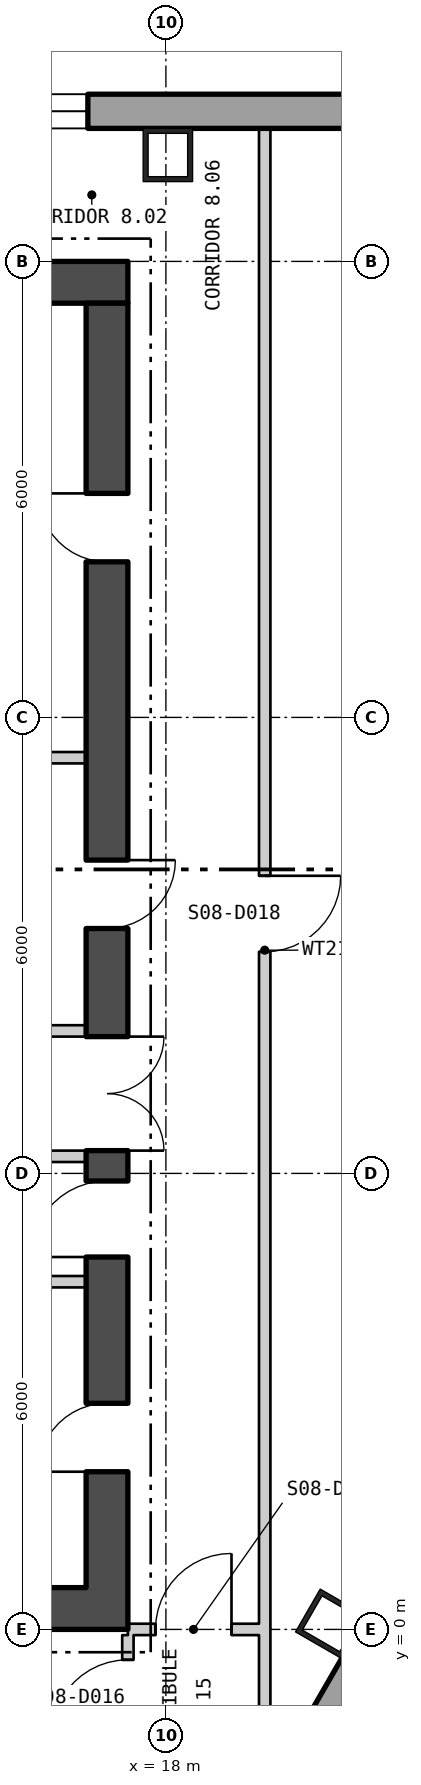
"""IFC4 building model, lengths in metres.
Left out: names, types, materials, properties, quantities, classifications, styles, units other than length and angle.
Written with IfcOpenShell. Run it as: python <this file> out.ifc"""

import sys

from ifc_helpers import new_model, si_unit, direction, frame, frame_2d, origin, origin_2d, place, context, subcontext, project, spatial, polyline, rectangle, hollow_rectangle, outline, extrude, element, fill, save


model = new_model("IFC4")
c1 = context("Model", 3, precision=1e-05, world=origin(), true_north=direction((0.0, 1.0)))
c2 = subcontext(c1, "Body", "Model", "MODEL_VIEW")
j1 = project(units=[si_unit("LENGTHUNIT", "METRE"), si_unit("PLANEANGLEUNIT", "RADIAN")], contexts=[c1])
p1 = place(None, origin())
s1 = spatial("IfcSite", under=j1, at=p1, CompositionType="ELEMENT")
p2 = place(p1, origin())
s2 = spatial("IfcBuilding", under=s1, at=p2, CompositionType="ELEMENT")
p3 = place(p2, frame((0.0, 0.0, 111.3)))
s3 = spatial("IfcBuildingStorey", under=s2, at=p3, CompositionType="ELEMENT", Elevation=111.3)
for number, where, z_axis, x_axis in (
    (1, (18.026, 19.4, 0.0), (0.0, 0.0, 1.0), (-1.0, 0.0, 0.0)),
    (2, (20.171, 0.074, 0.0), (0.0, 0.0, 1.0), (0.5, 0.866, 0.0)),
):
    element("IfcColumn", number, at=place(p3, frame(where, z_axis=z_axis, x_axis=x_axis)), inside=s3, PredefinedType="COLUMN", context=c2, shape_type="SweptSolid", body=[
        extrude(hollow_rectangle(XDim=0.65, YDim=0.7, WallThickness=0.065, at=origin_2d()), origin(), (0.0, 0.0, 1.0), 4.5),
    ])
p4 = place(p3, frame((22.865, 19.975, -0.4), z_axis=(0.0, 0.0, 1.0), x_axis=(-1.0, 0.0, 0.0)))
e3 = element("IfcWall", 3, at=p4, inside=s3, PredefinedType="SOLIDWALL", context=c2, shape_type="SweptSolid", body=[
    extrude(outline(polyline([(-0.13, -0.225), (45.86, -0.225), (45.6, 0.225), (0.13, 0.225), (-0.13, -0.225)])), origin(), (0.0, 0.0, 1.0), 4.5),
])
p5 = place(p4, frame((5.892, 0.0, 1.3)))
e4 = element("IfcOpeningElement", 4, at=p5, cuts=e3, PredefinedType="OPENING", context=c2, shape_type="SweptSolid", body=[
    extrude(rectangle(XDim=2.4, YDim=2.6, at=frame_2d((1.2, 1.3))), frame((0.0, 0.235, 0.0), z_axis=(0.0, -1.0, 0.0), x_axis=(1.0, 0.0, 0.0)), (0.0, 0.0, 1.0), 0.47),
])
p6 = place(p4, frame((10.399, 0.0, 1.3)))
e5 = element("IfcOpeningElement", 5, at=p6, cuts=e3, PredefinedType="OPENING", context=c2, shape_type="SweptSolid", body=[
    extrude(rectangle(XDim=2.4, YDim=2.6, at=frame_2d((1.2, 1.3))), frame((0.0, 0.235, 0.0), z_axis=(0.0, -1.0, 0.0), x_axis=(1.0, 0.0, 0.0)), (0.0, 0.0, 1.0), 0.47),
])
p7 = place(p4, frame((14.905, 0.0, 1.3)))
e6 = element("IfcOpeningElement", 6, at=p7, cuts=e3, PredefinedType="OPENING", context=c2, shape_type="SweptSolid", body=[
    extrude(rectangle(XDim=2.4, YDim=2.6, at=frame_2d((1.2, 1.3))), frame((0.0, 0.235, 0.0), z_axis=(0.0, -1.0, 0.0), x_axis=(1.0, 0.0, 0.0)), (0.0, 0.0, 1.0), 0.47),
])
p8 = place(p4, frame((19.412, 0.0, 1.3)))
e7 = element("IfcOpeningElement", 7, at=p8, cuts=e3, PredefinedType="OPENING", context=c2, shape_type="SweptSolid", body=[
    extrude(rectangle(XDim=2.4, YDim=2.6, at=frame_2d((1.2, 1.3))), frame((0.0, 0.235, 0.0), z_axis=(0.0, -1.0, 0.0), x_axis=(1.0, 0.0, 0.0)), (0.0, 0.0, 1.0), 0.47),
])
p9 = place(p4, frame((23.918, 0.0, 1.3)))
e8 = element("IfcOpeningElement", 8, at=p9, cuts=e3, PredefinedType="OPENING", context=c2, shape_type="SweptSolid", body=[
    extrude(rectangle(XDim=2.4, YDim=2.6, at=frame_2d((1.2, 1.3))), frame((0.0, 0.235, 0.0), z_axis=(0.0, -1.0, 0.0), x_axis=(1.0, 0.0, 0.0)), (0.0, 0.0, 1.0), 0.47),
])
p10 = place(p4, frame((28.425, 0.0, 1.3)))
e9 = element("IfcOpeningElement", 9, at=p10, cuts=e3, PredefinedType="OPENING", context=c2, shape_type="SweptSolid", body=[
    extrude(rectangle(XDim=2.4, YDim=2.6, at=frame_2d((1.2, 1.3))), frame((0.0, 0.235, 0.0), z_axis=(0.0, -1.0, 0.0), x_axis=(1.0, 0.0, 0.0)), (0.0, 0.0, 1.0), 0.47),
])
p11 = place(p4, frame((32.932, 0.0, 1.3)))
e10 = element("IfcOpeningElement", 10, at=p11, cuts=e3, PredefinedType="OPENING", context=c2, shape_type="SweptSolid", body=[
    extrude(rectangle(XDim=2.4, YDim=2.6, at=frame_2d((1.2, 1.3))), frame((0.0, 0.235, 0.0), z_axis=(0.0, -1.0, 0.0), x_axis=(1.0, 0.0, 0.0)), (0.0, 0.0, 1.0), 0.47),
])
p12 = place(p4, frame((37.438, 0.0, 1.3)))
e11 = element("IfcOpeningElement", 11, at=p12, cuts=e3, PredefinedType="OPENING", context=c2, shape_type="SweptSolid", body=[
    extrude(rectangle(XDim=2.4, YDim=2.6, at=frame_2d((1.2, 1.3))), frame((0.0, 0.235, 0.0), z_axis=(0.0, -1.0, 0.0), x_axis=(1.0, 0.0, 0.0)), (0.0, 0.0, 1.0), 0.47),
])
p13 = place(p3, frame((4.73, -27.821, -0.18), z_axis=(0.0, 0.0, 1.0), x_axis=(0.500000141277, 0.866025322218, 0.0)))
e12 = element("IfcWall", 12, at=p13, inside=s3, PredefinedType="SOLIDWALL", context=c2, shape_type="SweptSolid", body=[
    extrude(outline(polyline([(-0.13, -0.225), (45.86, -0.225), (45.6, 0.225), (0.13, 0.225), (-0.13, -0.225)])), origin(), (0.0, 0.0, 1.0), 4.28),
])
p14 = place(p13, frame((1.424, 0.0, 1.08)))
e13 = element("IfcOpeningElement", 13, at=p14, cuts=e12, PredefinedType="OPENING", context=c2, shape_type="SweptSolid", body=[
    extrude(rectangle(XDim=2.4, YDim=2.6, at=frame_2d((1.2, 1.3))), frame((0.0, 0.235, 0.0), z_axis=(0.0, -1.0, 0.0), x_axis=(1.0, 0.0, 0.0)), (0.0, 0.0, 1.0), 0.47),
])
p15 = place(p13, frame((5.892, 0.0, 1.08)))
e14 = element("IfcOpeningElement", 14, at=p15, cuts=e12, PredefinedType="OPENING", context=c2, shape_type="SweptSolid", body=[
    extrude(rectangle(XDim=2.4, YDim=2.6, at=frame_2d((1.2, 1.3))), frame((0.0, 0.235, 0.0), z_axis=(0.0, -1.0, 0.0), x_axis=(1.0, 0.0, 0.0)), (0.0, 0.0, 1.0), 0.47),
])
p16 = place(p13, frame((10.399, 0.0, 1.08)))
e15 = element("IfcOpeningElement", 15, at=p16, cuts=e12, PredefinedType="OPENING", context=c2, shape_type="SweptSolid", body=[
    extrude(rectangle(XDim=2.4, YDim=2.6, at=frame_2d((1.2, 1.3))), frame((0.0, 0.235, 0.0), z_axis=(0.0, -1.0, 0.0), x_axis=(1.0, 0.0, 0.0)), (0.0, 0.0, 1.0), 0.47),
])
p17 = place(p13, frame((14.905, 0.0, 1.08)))
e16 = element("IfcOpeningElement", 16, at=p17, cuts=e12, PredefinedType="OPENING", context=c2, shape_type="SweptSolid", body=[
    extrude(rectangle(XDim=2.4, YDim=2.6, at=frame_2d((1.2, 1.3))), frame((0.0, 0.235, 0.0), z_axis=(0.0, -1.0, 0.0), x_axis=(1.0, 0.0, 0.0)), (0.0, 0.0, 1.0), 0.47),
])
p18 = place(p13, frame((19.412, 0.0, 1.08)))
e17 = element("IfcOpeningElement", 17, at=p18, cuts=e12, PredefinedType="OPENING", context=c2, shape_type="SweptSolid", body=[
    extrude(rectangle(XDim=2.4, YDim=2.6, at=frame_2d((1.2, 1.3))), frame((0.0, 0.235, 0.0), z_axis=(0.0, -1.0, 0.0), x_axis=(1.0, 0.0, 0.0)), (0.0, 0.0, 1.0), 0.47),
])
p19 = place(p13, frame((23.918, 0.0, 1.08)))
e18 = element("IfcOpeningElement", 18, at=p19, cuts=e12, PredefinedType="OPENING", context=c2, shape_type="SweptSolid", body=[
    extrude(rectangle(XDim=2.4, YDim=2.6, at=frame_2d((1.2, 1.3))), frame((0.0, 0.235, 0.0), z_axis=(0.0, -1.0, 0.0), x_axis=(1.0, 0.0, 0.0)), (0.0, 0.0, 1.0), 0.47),
])
p20 = place(p13, frame((28.425, 0.0, 1.08)))
e19 = element("IfcOpeningElement", 19, at=p20, cuts=e12, PredefinedType="OPENING", context=c2, shape_type="SweptSolid", body=[
    extrude(rectangle(XDim=2.4, YDim=2.6, at=frame_2d((1.2, 1.3))), frame((0.0, 0.235, 0.0), z_axis=(0.0, -1.0, 0.0), x_axis=(1.0, 0.0, 0.0)), (0.0, 0.0, 1.0), 0.47),
])
p21 = place(p13, frame((32.932, 0.0, 1.08)))
e20 = element("IfcOpeningElement", 20, at=p21, cuts=e12, PredefinedType="OPENING", context=c2, shape_type="SweptSolid", body=[
    extrude(rectangle(XDim=2.4, YDim=2.6, at=frame_2d((1.2, 1.3))), frame((0.0, 0.235, 0.0), z_axis=(0.0, -1.0, 0.0), x_axis=(1.0, 0.0, 0.0)), (0.0, 0.0, 1.0), 0.47),
])
p22 = place(p13, frame((37.438, 0.0, 1.08)))
e21 = element("IfcOpeningElement", 21, at=p22, cuts=e12, PredefinedType="OPENING", context=c2, shape_type="SweptSolid", body=[
    extrude(rectangle(XDim=2.4, YDim=2.6, at=frame_2d((1.2, 1.3))), frame((0.0, 0.235, 0.0), z_axis=(0.0, -1.0, 0.0), x_axis=(1.0, 0.0, 0.0)), (0.0, 0.0, 1.0), 0.47),
])
p23 = place(p13, frame((41.907, 0.0, 1.08)))
e22 = element("IfcOpeningElement", 22, at=p23, cuts=e12, PredefinedType="OPENING", context=c2, shape_type="SweptSolid", body=[
    extrude(rectangle(XDim=2.4, YDim=2.6, at=frame_2d((1.2, 1.3))), frame((0.0, 0.235, 0.0), z_axis=(0.0, -1.0, 0.0), x_axis=(1.0, 0.0, 0.0)), (0.0, 0.0, 1.0), 0.47),
])
p24 = place(p3, frame((-17.5, 0.275, 0.0), z_axis=(0.0, 0.0, 1.0), x_axis=(1.0, 0.0, 0.0)))
e23 = element("IfcWall", 23, at=p24, inside=s3, PredefinedType="SHEAR", context=c2, shape_type="SweptSolid", body=[
    extrude(rectangle(XDim=35.0, YDim=0.55, at=frame_2d((17.5, 0.0))), origin(), (0.0, 0.0, 1.0), 4.3),
])
p25 = place(p24, frame((12.0, 0.0, 0.0)))
e24 = element("IfcOpeningElement", 24, at=p25, cuts=e23, PredefinedType="OPENING", context=c2, shape_type="SweptSolid", body=[
    extrude(rectangle(XDim=1.8, YDim=2.4, at=frame_2d((0.9, 1.2))), frame((0.0, 0.285, 0.0), z_axis=(0.0, -1.0, 0.0), x_axis=(1.0, 0.0, 0.0)), (0.0, 0.0, 1.0), 0.57),
])
p26 = place(p24, frame((22.0, 0.0, 0.0)))
e25 = element("IfcOpeningElement", 25, at=p26, cuts=e23, PredefinedType="OPENING", context=c2, shape_type="SweptSolid", body=[
    extrude(rectangle(XDim=1.8, YDim=2.4, at=frame_2d((0.9, 1.2))), frame((0.0, 0.285, 0.0), z_axis=(0.0, -1.0, 0.0), x_axis=(1.0, 0.0, 0.0)), (0.0, 0.0, 1.0), 0.57),
])
p27 = place(p3, frame((-17.5, 17.725, 0.0), z_axis=(0.0, 0.0, 1.0), x_axis=(1.0, 0.0, 0.0)))
e26 = element("IfcWall", 26, at=p27, inside=s3, PredefinedType="SHEAR", context=c2, shape_type="SweptSolid", body=[
    extrude(rectangle(XDim=35.0, YDim=0.55, at=frame_2d((17.5, 0.0))), origin(), (0.0, 0.0, 1.0), 4.3),
])
p28 = place(p3, frame((17.225, 0.55, 0.0), z_axis=(0.0, 0.0, 1.0), x_axis=(0.0, 1.0, 0.0)))
e27 = element("IfcWall", 27, at=p28, inside=s3, PredefinedType="SHEAR", context=c2, shape_type="SweptSolid", body=[
    extrude(rectangle(XDim=16.9, YDim=0.55, at=frame_2d((8.45, 0.0))), origin(), (0.0, 0.0, 1.0), 4.3),
])
p29 = place(p28, frame((5.75, 0.0, 0.0)))
e28 = element("IfcOpeningElement", 28, at=p29, cuts=e27, PredefinedType="OPENING", context=c2, shape_type="SweptSolid", body=[
    extrude(rectangle(XDim=1.5, YDim=2.1, at=frame_2d((0.75, 1.05))), frame((0.0, 0.285, 0.0), z_axis=(0.0, -1.0, 0.0), x_axis=(1.0, 0.0, 0.0)), (0.0, 0.0, 1.0), 0.57),
])
p30 = place(p28, frame((1.525, 0.0, 0.0)))
e29 = element("IfcOpeningElement", 29, at=p30, cuts=e27, PredefinedType="OPENING", context=c2, shape_type="SweptSolid", body=[
    extrude(rectangle(XDim=0.9, YDim=2.1, at=frame_2d((0.45, 1.05))), frame((0.0, 0.285, 0.0), z_axis=(0.0, -1.0, 0.0), x_axis=(1.0, 0.0, 0.0)), (0.0, 0.0, 1.0), 0.57),
])
p31 = place(p28, frame((4.35, 0.0, 0.0)))
e30 = element("IfcOpeningElement", 30, at=p31, cuts=e27, PredefinedType="OPENING", context=c2, shape_type="SweptSolid", body=[
    extrude(rectangle(XDim=1.0, YDim=2.1, at=frame_2d((0.5, 1.05))), frame((0.0, 0.285, 0.0), z_axis=(0.0, -1.0, 0.0), x_axis=(1.0, 0.0, 0.0)), (0.0, 0.0, 1.0), 0.57),
])
p32 = place(p28, frame((8.672, 0.0, 0.0)))
e31 = element("IfcOpeningElement", 31, at=p32, cuts=e27, PredefinedType="OPENING", context=c2, shape_type="SweptSolid", body=[
    extrude(rectangle(XDim=0.9, YDim=2.1, at=frame_2d((0.45, 1.05))), frame((0.0, 0.285, 0.0), z_axis=(0.0, -1.0, 0.0), x_axis=(1.0, 0.0, 0.0)), (0.0, 0.0, 1.0), 0.57),
])
p33 = place(p28, frame((13.497, 0.0, 0.0)))
e32 = element("IfcOpeningElement", 32, at=p33, cuts=e27, PredefinedType="OPENING", context=c2, shape_type="SweptSolid", body=[
    extrude(rectangle(XDim=0.9, YDim=2.1, at=frame_2d((0.45, 1.05))), frame((0.0, 0.285, 0.0), z_axis=(0.0, -1.0, 0.0), x_axis=(1.0, 0.0, 0.0)), (0.0, 0.0, 1.0), 0.57),
])
for number, where, z_axis, x_axis in (
    (33, (14.5, 6.225, 0.0), (0.0, 0.0, 1.0), (1.0, 0.0, 0.0)),
    (34, (14.5, 7.875, 0.0), (0.0, 0.0, 1.0), (1.0, 0.0, 0.0)),
    (35, (14.5, 4.575, 0.0), (0.0, 0.0, 1.0), (1.0, 0.0, 0.0)),
    (36, (14.5, 11.47, 0.0), (0.0, 0.0, 1.0), (1.0, 0.0, 0.0)),
):
    element("IfcWall", number, at=place(p3, frame(where, z_axis=z_axis, x_axis=x_axis)), inside=s3, PredefinedType="PARTITIONING", context=c2, shape_type="SweptSolid", body=[
        extrude(rectangle(XDim=2.45, YDim=0.15, at=frame_2d((1.225, 0.0))), origin(), (0.0, 0.0, 1.0), 4.3),
    ])
p34 = place(p3, frame((17.5, -1.725, 0.0), z_axis=(0.0, 0.0, 1.0), x_axis=(0.0, 1.0, 0.0)))
e37 = element("IfcWall", 37, at=p34, inside=s3, PredefinedType="PARTITIONING", context=c2, shape_type="SweptSolid", body=[
    extrude(rectangle(XDim=1.65, YDim=0.15, at=frame_2d((0.825, 0.0))), origin(), (0.0, 0.0, 1.0), 4.3),
])
p35 = place(p34, frame((0.325, 0.0, 0.0)))
e38 = element("IfcOpeningElement", 38, at=p35, cuts=e37, PredefinedType="OPENING", context=c2, shape_type="SweptSolid", body=[
    extrude(rectangle(XDim=1.0, YDim=2.1, at=frame_2d((0.5, 1.05))), frame((0.0, 0.085, 0.0), z_axis=(0.0, -1.0, 0.0), x_axis=(1.0, 0.0, 0.0)), (0.0, 0.0, 1.0), 0.17),
])
p36 = place(p3, frame((17.5, 0.0, 0.0), z_axis=(0.0, 0.0, 1.0), x_axis=(1.0, 0.0, 0.0)))
e39 = element("IfcWall", 39, at=p36, inside=s3, PredefinedType="PARTITIONING", context=c2, shape_type="SweptSolid", body=[
    extrude(rectangle(XDim=1.725, YDim=0.15, at=frame_2d((0.863, 0.0))), origin(), (0.0, 0.0, 1.0), 3.7),
])
p37 = place(p36, frame((0.363, 0.0, 0.0)))
e40 = element("IfcOpeningElement", 40, at=p37, cuts=e39, PredefinedType="OPENING", context=c2, shape_type="SweptSolid", body=[
    extrude(rectangle(XDim=1.0, YDim=2.1, at=frame_2d((0.5, 1.05))), frame((0.0, 0.085, 0.0), z_axis=(0.0, -1.0, 0.0), x_axis=(1.0, 0.0, 0.0)), (0.0, 0.0, 1.0), 0.17),
])
p38 = place(p3, frame((19.3, -1.875, 0.0), z_axis=(0.0, 0.0, 1.0), x_axis=(0.0, 1.0, 0.0)))
e41 = element("IfcWall", 41, at=p38, inside=s3, PredefinedType="PARTITIONING", context=c2, shape_type="SweptSolid", body=[
    extrude(rectangle(XDim=21.625, YDim=0.15, at=frame_2d((10.812, 0.0))), origin(), (0.0, 0.0, 1.0), 4.3),
])
p39 = place(p38, frame((10.791, 0.0, 0.0)))
e42 = element("IfcOpeningElement", 42, at=p39, cuts=e41, PredefinedType="OPENING", context=c2, shape_type="SweptSolid", body=[
    extrude(rectangle(XDim=1.0, YDim=2.1, at=frame_2d((0.5, 1.05))), frame((0.0, 0.085, 0.0), z_axis=(0.0, -1.0, 0.0), x_axis=(1.0, 0.0, 0.0)), (0.0, 0.0, 1.0), 0.17),
])
p40 = place(p5, origin())
e43 = element("IfcWindow", 43, at=p40, inside=s3, PartitioningType="SINGLE_PANEL", PredefinedType="WINDOW", context=c2, shape_type="SweptSolid", body=[
    extrude(rectangle(XDim=2.4, YDim=2.6, at=frame_2d((1.2, 1.3))), frame((0.0, 0.105, 0.0), z_axis=(0.0, -1.0, 0.0), x_axis=(1.0, 0.0, 0.0)), (0.0, 0.0, 1.0), 0.06),
])
fill(e4, e43)
p41 = place(p29, origin())
e44 = element("IfcDoor", 44, at=p41, inside=s3, OperationType="DOUBLE_DOOR_SINGLE_SWING", PredefinedType="DOOR", context=c2, shape_type="SweptSolid", body=[
    extrude(rectangle(XDim=1.5, YDim=2.1, at=frame_2d((0.75, 1.05))), frame((0.0, 0.025, 0.0), z_axis=(0.0, -1.0, 0.0), x_axis=(1.0, 0.0, 0.0)), (0.0, 0.0, 1.0), 0.05),
])
fill(e28, e44)
p42 = place(p30, origin())
e45 = element("IfcDoor", 45, at=p42, inside=s3, OperationType="SINGLE_SWING_RIGHT", PredefinedType="DOOR", context=c2, shape_type="SweptSolid", body=[
    extrude(rectangle(XDim=0.9, YDim=2.1, at=frame_2d((0.45, 1.05))), frame((0.0, 0.025, 0.0), z_axis=(0.0, -1.0, 0.0), x_axis=(1.0, 0.0, 0.0)), (0.0, 0.0, 1.0), 0.05),
])
fill(e29, e45)
p43 = place(p31, origin())
e46 = element("IfcDoor", 46, at=p43, inside=s3, OperationType="SINGLE_SWING_RIGHT", PredefinedType="DOOR", context=c2, shape_type="SweptSolid", body=[
    extrude(rectangle(XDim=1.0, YDim=2.1, at=frame_2d((0.5, 1.05))), frame((0.0, 0.025, 0.0), z_axis=(0.0, -1.0, 0.0), x_axis=(1.0, 0.0, 0.0)), (0.0, 0.0, 1.0), 0.05),
])
fill(e30, e46)
p44 = place(p32, origin())
e47 = element("IfcDoor", 47, at=p44, inside=s3, OperationType="SINGLE_SWING_RIGHT", PredefinedType="DOOR", context=c2, shape_type="SweptSolid", body=[
    extrude(rectangle(XDim=0.9, YDim=2.1, at=frame_2d((0.45, 1.05))), frame((0.0, 0.025, 0.0), z_axis=(0.0, -1.0, 0.0), x_axis=(1.0, 0.0, 0.0)), (0.0, 0.0, 1.0), 0.05),
])
fill(e31, e47)
p45 = place(p33, origin())
e48 = element("IfcDoor", 48, at=p45, inside=s3, OperationType="SINGLE_SWING_LEFT", PredefinedType="DOOR", context=c2, shape_type="SweptSolid", body=[
    extrude(rectangle(XDim=0.9, YDim=2.1, at=frame_2d((0.45, 1.05))), frame((0.0, 0.025, 0.0), z_axis=(0.0, -1.0, 0.0), x_axis=(1.0, 0.0, 0.0)), (0.0, 0.0, 1.0), 0.05),
])
fill(e32, e48)
p46 = place(p35, origin())
e49 = element("IfcDoor", 49, at=p46, inside=s3, OperationType="SINGLE_SWING_RIGHT", PredefinedType="DOOR", context=c2, shape_type="SweptSolid", body=[
    extrude(rectangle(XDim=1.0, YDim=2.1, at=frame_2d((0.5, 1.05))), frame((0.0, 0.025, 0.0), z_axis=(0.0, -1.0, 0.0), x_axis=(1.0, 0.0, 0.0)), (0.0, 0.0, 1.0), 0.05),
])
fill(e38, e49)
p47 = place(p37, origin())
e50 = element("IfcDoor", 50, at=p47, inside=s3, OperationType="SINGLE_SWING_LEFT", PredefinedType="DOOR", context=c2, shape_type="SweptSolid", body=[
    extrude(rectangle(XDim=1.0, YDim=2.1, at=frame_2d((0.5, 1.05))), frame((0.0, 0.025, 0.0), z_axis=(0.0, -1.0, 0.0), x_axis=(1.0, 0.0, 0.0)), (0.0, 0.0, 1.0), 0.05),
])
fill(e40, e50)
p48 = place(p39, origin())
e51 = element("IfcDoor", 51, at=p48, inside=s3, OperationType="SINGLE_SWING_RIGHT", PredefinedType="DOOR", context=c2, shape_type="SweptSolid", body=[
    extrude(rectangle(XDim=1.0, YDim=2.1, at=frame_2d((0.5, 1.05))), frame((0.0, 0.025, 0.0), z_axis=(0.0, -1.0, 0.0), x_axis=(1.0, 0.0, 0.0)), (0.0, 0.0, 1.0), 0.05),
])
fill(e42, e51)
save(model, sys.argv[1])
